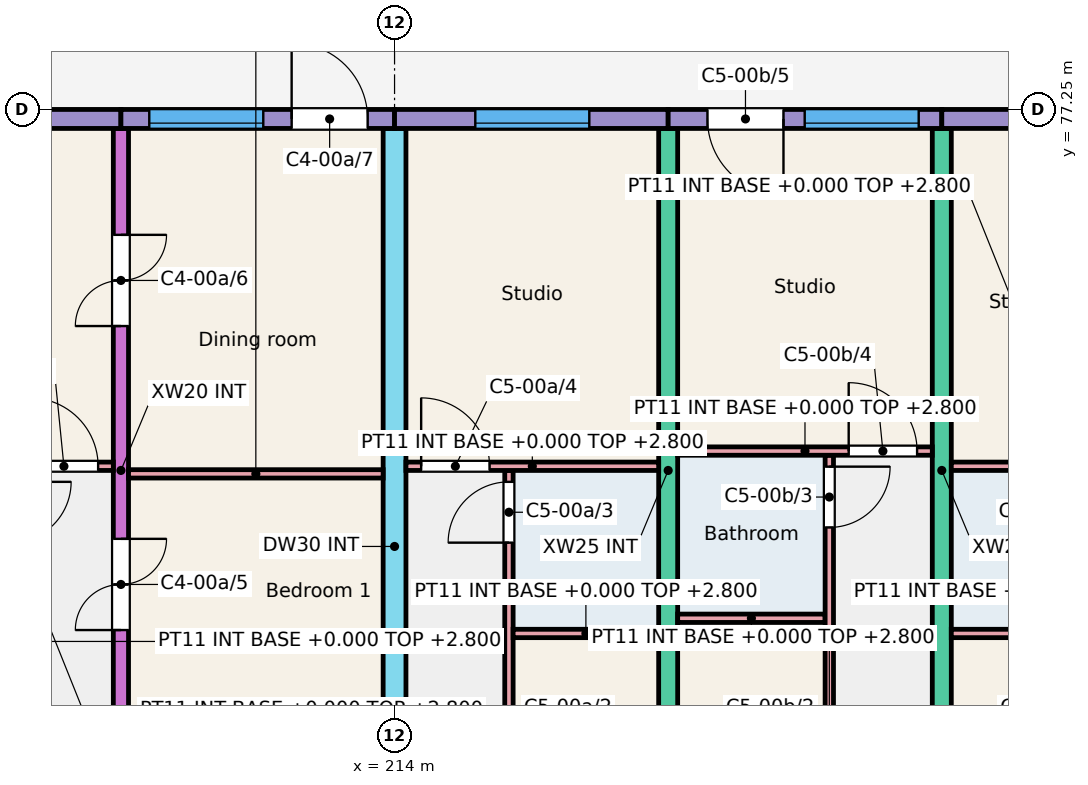
"""IFC4 building model, lengths in metres.
Left out: names, types, materials, properties, quantities, classifications, styles, units other than length and angle.
Written with IfcOpenShell. Run it as: python <this file> out.ifc"""

import sys

from ifc_helpers import new_model, si_unit, direction, frame, frame_2d, origin, place, context, subcontext, project, spatial, rectangle, extrude, element, fill, save


model = new_model("IFC4")
c1 = context("Model", 3, precision=1e-05, world=origin(), true_north=direction((0.0, 1.0)))
c2 = subcontext(c1, "Body", "Model", "MODEL_VIEW")
j1 = project(units=[si_unit("LENGTHUNIT", "METRE"), si_unit("PLANEANGLEUNIT", "RADIAN")], contexts=[c1])
p1 = place(None, origin())
s1 = spatial("IfcSite", under=j1, at=p1, CompositionType="ELEMENT")
p2 = place(p1, origin())
s2 = spatial("IfcBuilding", under=s1, at=p2, CompositionType="ELEMENT")
p3 = place(p2, origin())
s3 = spatial("IfcBuildingStorey", under=s2, at=p3, CompositionType="ELEMENT", Elevation=0.0)
p4 = place(p3, frame((210.4, 68.0, -0.25), z_axis=(0.0, 0.0, 1.0), x_axis=(0.0, 1.0, 0.0)))
e1 = element("IfcWall", 1, at=p4, inside=s3, PredefinedType="SHEAR", context=c2, shape_type="SweptSolid", body=[
    extrude(rectangle(XDim=9.0, YDim=0.2, at=frame_2d((4.5, 0.0))), origin(), (0.0, 0.0, 1.0), 3.25),
])
p5 = place(p4, frame((2.4, 0.0, 0.25)))
e2 = element("IfcOpeningElement", 2, at=p5, cuts=e1, PredefinedType="OPENING", context=c2, shape_type="SweptSolid", body=[
    extrude(rectangle(XDim=1.2, YDim=2.1, at=frame_2d((0.6, 1.05))), frame((0.0, 0.11, 0.0), z_axis=(0.0, -1.0, 0.0), x_axis=(1.0, 0.0, 0.0)), (0.0, 0.0, 1.0), 0.22),
])
p6 = place(p4, frame((6.4, 0.0, 0.25)))
e3 = element("IfcOpeningElement", 3, at=p6, cuts=e1, PredefinedType="OPENING", context=c2, shape_type="SweptSolid", body=[
    extrude(rectangle(XDim=1.2, YDim=2.1, at=frame_2d((0.6, 1.05))), frame((0.0, 0.11, 0.0), z_axis=(0.0, -1.0, 0.0), x_axis=(1.0, 0.0, 0.0)), (0.0, 0.0, 1.0), 0.22),
])
p7 = place(p3, frame((214.0, 66.0, -0.25), z_axis=(0.0, 0.0, 1.0), x_axis=(0.0, 1.0, 0.0)))
e4 = element("IfcWall", 4, at=p7, inside=s3, PredefinedType="SHEAR", context=c2, shape_type="SweptSolid", body=[
    extrude(rectangle(XDim=11.0, YDim=0.3, at=frame_2d((5.5, 0.0))), origin(), (0.0, 0.0, 1.0), 3.25),
])
p8 = place(p7, frame((0.3, 0.0, 0.25)))
e5 = element("IfcOpeningElement", 5, at=p8, cuts=e4, PredefinedType="OPENING", context=c2, shape_type="SweptSolid", body=[
    extrude(rectangle(XDim=1.2, YDim=2.1, at=frame_2d((0.6, 1.05))), frame((0.0, 0.16, 0.0), z_axis=(0.0, -1.0, 0.0), x_axis=(1.0, 0.0, 0.0)), (0.0, 0.0, 1.0), 0.32),
])
for number, where, z_axis, x_axis in (
    (6, (217.6, 68.0, -0.25), (0.0, 0.0, 1.0), (0.0, 1.0, 0.0)),
    (7, (221.2, 68.0, -0.25), (0.0, 0.0, 1.0), (0.0, 1.0, 0.0)),
):
    element("IfcWall", number, at=place(p3, frame(where, z_axis=z_axis, x_axis=x_axis)), inside=s3, PredefinedType="SHEAR", context=c2, shape_type="SweptSolid", body=[
        extrude(rectangle(XDim=9.0, YDim=0.25, at=frame_2d((4.5, 0.0))), origin(), (0.0, 0.0, 1.0), 3.25),
    ])
p9 = place(p3, frame((206.8, 77.125, -0.25), z_axis=(0.0, 0.0, 1.0), x_axis=(1.0, 0.0, 0.0)))
e8 = element("IfcWall", 8, at=p9, inside=s3, PredefinedType="SOLIDWALL", context=c2, shape_type="SweptSolid", body=[
    extrude(rectangle(XDim=3.6, YDim=0.25, at=frame_2d((1.8, 0.0))), origin(), (0.0, 0.0, 1.0), 3.25),
])
p10 = place(p9, frame((1.062, 0.0, 1.15)))
e9 = element("IfcOpeningElement", 9, at=p10, cuts=e8, PredefinedType="OPENING", context=c2, shape_type="SweptSolid", body=[
    extrude(rectangle(XDim=1.5, YDim=1.5, at=frame_2d((0.75, 0.75))), frame((0.0, 0.135, 0.0), z_axis=(0.0, -1.0, 0.0), x_axis=(1.0, 0.0, 0.0)), (0.0, 0.0, 1.0), 0.27),
])
p11 = place(p3, frame((210.4, 77.125, -0.25), z_axis=(0.0, 0.0, 1.0), x_axis=(1.0, 0.0, 0.0)))
e10 = element("IfcWall", 10, at=p11, inside=s3, PredefinedType="SOLIDWALL", context=c2, shape_type="SweptSolid", body=[
    extrude(rectangle(XDim=3.6, YDim=0.25, at=frame_2d((1.8, 0.0))), origin(), (0.0, 0.0, 1.0), 3.25),
])
p12 = place(p11, frame((0.373, 0.0, 1.15)))
e11 = element("IfcOpeningElement", 11, at=p12, cuts=e10, PredefinedType="OPENING", context=c2, shape_type="SweptSolid", body=[
    extrude(rectangle(XDim=1.5, YDim=1.5, at=frame_2d((0.75, 0.75))), frame((0.0, 0.135, 0.0), z_axis=(0.0, -1.0, 0.0), x_axis=(1.0, 0.0, 0.0)), (0.0, 0.0, 1.0), 0.27),
])
p13 = place(p11, frame((2.246, 0.0, 0.25)))
e12 = element("IfcOpeningElement", 12, at=p13, cuts=e10, PredefinedType="OPENING", context=c2, shape_type="SweptSolid", body=[
    extrude(rectangle(XDim=1.0, YDim=2.1, at=frame_2d((0.5, 1.05))), frame((0.0, 0.135, 0.0), z_axis=(0.0, -1.0, 0.0), x_axis=(1.0, 0.0, 0.0)), (0.0, 0.0, 1.0), 0.27),
])
p14 = place(p3, frame((214.0, 77.125, -0.25), z_axis=(0.0, 0.0, 1.0), x_axis=(1.0, 0.0, 0.0)))
e13 = element("IfcWall", 13, at=p14, inside=s3, PredefinedType="SOLIDWALL", context=c2, shape_type="SweptSolid", body=[
    extrude(rectangle(XDim=3.6, YDim=0.25, at=frame_2d((1.8, 0.0))), origin(), (0.0, 0.0, 1.0), 3.25),
])
p15 = place(p14, frame((1.062, 0.0, 1.15)))
e14 = element("IfcOpeningElement", 14, at=p15, cuts=e13, PredefinedType="OPENING", context=c2, shape_type="SweptSolid", body=[
    extrude(rectangle(XDim=1.5, YDim=1.5, at=frame_2d((0.75, 0.75))), frame((0.0, 0.135, 0.0), z_axis=(0.0, -1.0, 0.0), x_axis=(1.0, 0.0, 0.0)), (0.0, 0.0, 1.0), 0.27),
])
p16 = place(p3, frame((217.6, 77.125, -0.25), z_axis=(0.0, 0.0, 1.0), x_axis=(1.0, 0.0, 0.0)))
e15 = element("IfcWall", 15, at=p16, inside=s3, PredefinedType="SOLIDWALL", context=c2, shape_type="SweptSolid", body=[
    extrude(rectangle(XDim=3.6, YDim=0.25, at=frame_2d((1.8, 0.0))), origin(), (0.0, 0.0, 1.0), 3.25),
])
p17 = place(p16, frame((1.796, 0.0, 1.15)))
e16 = element("IfcOpeningElement", 16, at=p17, cuts=e15, PredefinedType="OPENING", context=c2, shape_type="SweptSolid", body=[
    extrude(rectangle(XDim=1.5, YDim=1.5, at=frame_2d((0.75, 0.75))), frame((0.0, 0.135, 0.0), z_axis=(0.0, -1.0, 0.0), x_axis=(1.0, 0.0, 0.0)), (0.0, 0.0, 1.0), 0.27),
])
p18 = place(p16, frame((0.517, 0.0, 0.25)))
e17 = element("IfcOpeningElement", 17, at=p18, cuts=e15, PredefinedType="OPENING", context=c2, shape_type="SweptSolid", body=[
    extrude(rectangle(XDim=1.0, YDim=2.1, at=frame_2d((0.5, 1.05))), frame((0.0, 0.135, 0.0), z_axis=(0.0, -1.0, 0.0), x_axis=(1.0, 0.0, 0.0)), (0.0, 0.0, 1.0), 0.27),
])
p19 = place(p3, frame((221.2, 77.125, -0.25), z_axis=(0.0, 0.0, 1.0), x_axis=(1.0, 0.0, 0.0)))
e18 = element("IfcWall", 18, at=p19, inside=s3, PredefinedType="SOLIDWALL", context=c2, shape_type="SweptSolid", body=[
    extrude(rectangle(XDim=3.6, YDim=0.25, at=frame_2d((1.8, 0.0))), origin(), (0.0, 0.0, 1.0), 3.25),
])
p20 = place(p19, frame((1.05, 0.0, 1.15)))
e19 = element("IfcOpeningElement", 19, at=p20, cuts=e18, PredefinedType="OPENING", context=c2, shape_type="SweptSolid", body=[
    extrude(rectangle(XDim=1.5, YDim=1.5, at=frame_2d((0.75, 0.75))), frame((0.0, 0.135, 0.0), z_axis=(0.0, -1.0, 0.0), x_axis=(1.0, 0.0, 0.0)), (0.0, 0.0, 1.0), 0.27),
])
p21 = place(p3, frame((206.925, 72.555, 0.0), z_axis=(0.0, 0.0, 1.0), x_axis=(1.0, 0.0, 0.0)))
e20 = element("IfcWall", 20, at=p21, inside=s3, PredefinedType="PARTITIONING", context=c2, shape_type="SweptSolid", body=[
    extrude(rectangle(XDim=3.375, YDim=0.11, at=frame_2d((1.688, 0.0))), origin(), (0.0, 0.0, 1.0), 2.8),
])
p22 = place(p21, frame((2.275, 0.0, 0.0)))
e21 = element("IfcOpeningElement", 21, at=p22, cuts=e20, PredefinedType="OPENING", context=c2, shape_type="SweptSolid", body=[
    extrude(rectangle(XDim=0.9, YDim=2.1, at=frame_2d((0.45, 1.05))), frame((0.0, 0.065, 0.0), z_axis=(0.0, -1.0, 0.0), x_axis=(1.0, 0.0, 0.0)), (0.0, 0.0, 1.0), 0.13),
])
p23 = place(p3, frame((210.5, 72.455, 0.0), z_axis=(0.0, 0.0, 1.0), x_axis=(1.0, 0.0, 0.0)))
e22 = element("IfcWall", 22, at=p23, inside=s3, PredefinedType="PARTITIONING", context=c2, shape_type="SweptSolid", body=[
    extrude(rectangle(XDim=3.35, YDim=0.11, at=frame_2d((1.675, 0.0))), origin(), (0.0, 0.0, 1.0), 2.8),
])
p24 = place(p3, frame((215.505, 68.0, 0.0), z_axis=(0.0, 0.0, 1.0), x_axis=(0.0, 1.0, 0.0)))
e23 = element("IfcWall", 23, at=p24, inside=s3, PredefinedType="PARTITIONING", context=c2, shape_type="SweptSolid", body=[
    extrude(rectangle(XDim=4.5, YDim=0.11, at=frame_2d((2.25, 0.0))), origin(), (0.0, 0.0, 1.0), 2.8),
])
p25 = place(p24, frame((0.2, 0.0, 0.0)))
e24 = element("IfcOpeningElement", 24, at=p25, cuts=e23, PredefinedType="OPENING", context=c2, shape_type="SweptSolid", body=[
    extrude(rectangle(XDim=0.8, YDim=2.1, at=frame_2d((0.4, 1.05))), frame((0.0, 0.065, 0.0), z_axis=(0.0, -1.0, 0.0), x_axis=(1.0, 0.0, 0.0)), (0.0, 0.0, 1.0), 0.13),
])
p26 = place(p24, frame((3.55, 0.0, 0.0)))
e25 = element("IfcOpeningElement", 25, at=p26, cuts=e23, PredefinedType="OPENING", context=c2, shape_type="SweptSolid", body=[
    extrude(rectangle(XDim=0.8, YDim=2.1, at=frame_2d((0.4, 1.05))), frame((0.0, 0.065, 0.0), z_axis=(0.0, -1.0, 0.0), x_axis=(1.0, 0.0, 0.0)), (0.0, 0.0, 1.0), 0.13),
])
p27 = place(p3, frame((215.56, 70.355, 0.0), z_axis=(0.0, 0.0, 1.0), x_axis=(1.0, 0.0, 0.0)))
e26 = element("IfcWall", 26, at=p27, inside=s3, PredefinedType="PARTITIONING", context=c2, shape_type="SweptSolid", body=[
    extrude(rectangle(XDim=1.915, YDim=0.11, at=frame_2d((0.958, 0.0))), origin(), (0.0, 0.0, 1.0), 2.8),
])
p28 = place(p3, frame((214.15, 72.555, 0.0), z_axis=(0.0, 0.0, 1.0), x_axis=(1.0, 0.0, 0.0)))
e27 = element("IfcWall", 27, at=p28, inside=s3, PredefinedType="PARTITIONING", context=c2, shape_type="SweptSolid", body=[
    extrude(rectangle(XDim=3.325, YDim=0.11, at=frame_2d((1.663, 0.0))), origin(), (0.0, 0.0, 1.0), 2.8),
])
p29 = place(p28, frame((0.2, 0.0, 0.0)))
e28 = element("IfcOpeningElement", 28, at=p29, cuts=e27, PredefinedType="OPENING", context=c2, shape_type="SweptSolid", body=[
    extrude(rectangle(XDim=0.9, YDim=2.1, at=frame_2d((0.45, 1.05))), frame((0.0, 0.065, 0.0), z_axis=(0.0, -1.0, 0.0), x_axis=(1.0, 0.0, 0.0)), (0.0, 0.0, 1.0), 0.13),
])
p30 = place(p3, frame((217.725, 70.555, 0.0), z_axis=(0.0, 0.0, 1.0), x_axis=(1.0, 0.0, 0.0)))
e29 = element("IfcWall", 29, at=p30, inside=s3, PredefinedType="PARTITIONING", context=c2, shape_type="SweptSolid", body=[
    extrude(rectangle(XDim=1.94, YDim=0.11, at=frame_2d((0.97, 0.0))), origin(), (0.0, 0.0, 1.0), 2.8),
])
p31 = place(p3, frame((219.72, 68.0, 0.0), z_axis=(0.0, 0.0, 1.0), x_axis=(0.0, 1.0, 0.0)))
e30 = element("IfcWall", 30, at=p31, inside=s3, PredefinedType="PARTITIONING", context=c2, shape_type="SweptSolid", body=[
    extrude(rectangle(XDim=4.7, YDim=0.11, at=frame_2d((2.35, 0.0))), origin(), (0.0, 0.0, 1.0), 2.8),
])
p32 = place(p31, frame((0.2, 0.0, 0.0)))
e31 = element("IfcOpeningElement", 31, at=p32, cuts=e30, PredefinedType="OPENING", context=c2, shape_type="SweptSolid", body=[
    extrude(rectangle(XDim=0.8, YDim=2.1, at=frame_2d((0.4, 1.05))), frame((0.0, 0.065, 0.0), z_axis=(0.0, -1.0, 0.0), x_axis=(1.0, 0.0, 0.0)), (0.0, 0.0, 1.0), 0.13),
])
p33 = place(p31, frame((3.75, 0.0, 0.0)))
e32 = element("IfcOpeningElement", 32, at=p33, cuts=e30, PredefinedType="OPENING", context=c2, shape_type="SweptSolid", body=[
    extrude(rectangle(XDim=0.8, YDim=2.1, at=frame_2d((0.4, 1.05))), frame((0.0, 0.065, 0.0), z_axis=(0.0, -1.0, 0.0), x_axis=(1.0, 0.0, 0.0)), (0.0, 0.0, 1.0), 0.13),
])
p34 = place(p3, frame((217.725, 72.755, 0.0), z_axis=(0.0, 0.0, 1.0), x_axis=(1.0, 0.0, 0.0)))
e33 = element("IfcWall", 33, at=p34, inside=s3, PredefinedType="PARTITIONING", context=c2, shape_type="SweptSolid", body=[
    extrude(rectangle(XDim=3.35, YDim=0.11, at=frame_2d((1.675, 0.0))), origin(), (0.0, 0.0, 1.0), 2.8),
])
p35 = place(p34, frame((2.25, 0.0, 0.0)))
e34 = element("IfcOpeningElement", 34, at=p35, cuts=e33, PredefinedType="OPENING", context=c2, shape_type="SweptSolid", body=[
    extrude(rectangle(XDim=0.9, YDim=2.1, at=frame_2d((0.45, 1.05))), frame((0.0, 0.065, 0.0), z_axis=(0.0, -1.0, 0.0), x_axis=(1.0, 0.0, 0.0)), (0.0, 0.0, 1.0), 0.13),
])
p36 = place(p3, frame((221.325, 70.355, 0.0), z_axis=(0.0, 0.0, 1.0), x_axis=(1.0, 0.0, 0.0)))
e35 = element("IfcWall", 35, at=p36, inside=s3, PredefinedType="PARTITIONING", context=c2, shape_type="SweptSolid", body=[
    extrude(rectangle(XDim=1.94, YDim=0.11, at=frame_2d((0.97, 0.0))), origin(), (0.0, 0.0, 1.0), 2.8),
])
p37 = place(p3, frame((221.325, 72.555, 0.0), z_axis=(0.0, 0.0, 1.0), x_axis=(1.0, 0.0, 0.0)))
e36 = element("IfcWall", 36, at=p37, inside=s3, PredefinedType="PARTITIONING", context=c2, shape_type="SweptSolid", body=[
    extrude(rectangle(XDim=3.35, YDim=0.11, at=frame_2d((1.675, 0.0))), origin(), (0.0, 0.0, 1.0), 2.8),
])
p38 = place(p37, frame((2.25, 0.0, 0.0)))
e37 = element("IfcOpeningElement", 37, at=p38, cuts=e36, PredefinedType="OPENING", context=c2, shape_type="SweptSolid", body=[
    extrude(rectangle(XDim=0.9, YDim=2.1, at=frame_2d((0.45, 1.05))), frame((0.0, 0.065, 0.0), z_axis=(0.0, -1.0, 0.0), x_axis=(1.0, 0.0, 0.0)), (0.0, 0.0, 1.0), 0.13),
])
p39 = place(p12, origin())
e38 = element("IfcWindow", 38, at=p39, inside=s3, PartitioningType="SINGLE_PANEL", PredefinedType="WINDOW", context=c2, shape_type="SweptSolid", body=[
    extrude(rectangle(XDim=1.5, YDim=1.5, at=frame_2d((0.75, 0.75))), frame((0.0, -0.025, 0.0), z_axis=(0.0, -1.0, 0.0), x_axis=(1.0, 0.0, 0.0)), (0.0, 0.0, 1.0), 0.06),
])
fill(e11, e38)
p40 = place(p15, origin())
e39 = element("IfcWindow", 39, at=p40, inside=s3, PartitioningType="SINGLE_PANEL", PredefinedType="WINDOW", context=c2, shape_type="SweptSolid", body=[
    extrude(rectangle(XDim=1.5, YDim=1.5, at=frame_2d((0.75, 0.75))), frame((0.0, -0.025, 0.0), z_axis=(0.0, -1.0, 0.0), x_axis=(1.0, 0.0, 0.0)), (0.0, 0.0, 1.0), 0.06),
])
fill(e14, e39)
p41 = place(p17, origin())
e40 = element("IfcWindow", 40, at=p41, inside=s3, PartitioningType="SINGLE_PANEL", PredefinedType="WINDOW", context=c2, shape_type="SweptSolid", body=[
    extrude(rectangle(XDim=1.5, YDim=1.5, at=frame_2d((0.75, 0.75))), frame((0.0, -0.025, 0.0), z_axis=(0.0, -1.0, 0.0), x_axis=(1.0, 0.0, 0.0)), (0.0, 0.0, 1.0), 0.06),
])
fill(e16, e40)
p42 = place(p22, origin())
e41 = element("IfcDoor", 41, at=p42, inside=s3, OperationType="SINGLE_SWING_LEFT", PredefinedType="DOOR", context=c2, shape_type="SweptSolid", body=[
    extrude(rectangle(XDim=0.9, YDim=2.1, at=frame_2d((0.45, 1.05))), frame((0.0, 0.025, 0.0), z_axis=(0.0, -1.0, 0.0), x_axis=(1.0, 0.0, 0.0)), (0.0, 0.0, 1.0), 0.05),
])
fill(e21, e41)
p43 = place(p5, origin())
e42 = element("IfcDoor", 42, at=p43, inside=s3, OperationType="DOUBLE_DOOR_SINGLE_SWING", PredefinedType="DOOR", context=c2, shape_type="SweptSolid", body=[
    extrude(rectangle(XDim=1.2, YDim=2.1, at=frame_2d((0.6, 1.05))), frame((0.0, 0.025, 0.0), z_axis=(0.0, -1.0, 0.0), x_axis=(1.0, 0.0, 0.0)), (0.0, 0.0, 1.0), 0.05),
])
fill(e2, e42)
p44 = place(p6, origin())
e43 = element("IfcDoor", 43, at=p44, inside=s3, OperationType="DOUBLE_DOOR_SINGLE_SWING", PredefinedType="DOOR", context=c2, shape_type="SweptSolid", body=[
    extrude(rectangle(XDim=1.2, YDim=2.1, at=frame_2d((0.6, 1.05))), frame((0.0, 0.025, 0.0), z_axis=(0.0, -1.0, 0.0), x_axis=(1.0, 0.0, 0.0)), (0.0, 0.0, 1.0), 0.05),
])
fill(e3, e43)
p45 = place(p13, origin())
e44 = element("IfcDoor", 44, at=p45, inside=s3, OperationType="SINGLE_SWING_LEFT", PredefinedType="DOOR", context=c2, shape_type="SweptSolid", body=[
    extrude(rectangle(XDim=1.0, YDim=2.1, at=frame_2d((0.5, 1.05))), frame((0.0, 0.025, 0.0), z_axis=(0.0, -1.0, 0.0), x_axis=(1.0, 0.0, 0.0)), (0.0, 0.0, 1.0), 0.05),
])
fill(e12, e44)
p46 = place(p26, origin())
e45 = element("IfcDoor", 45, at=p46, inside=s3, OperationType="SINGLE_SWING_LEFT", PredefinedType="DOOR", context=c2, shape_type="SweptSolid", body=[
    extrude(rectangle(XDim=0.8, YDim=2.1, at=frame_2d((0.4, 1.05))), frame((0.0, 0.025, 0.0), z_axis=(0.0, -1.0, 0.0), x_axis=(1.0, 0.0, 0.0)), (0.0, 0.0, 1.0), 0.05),
])
fill(e25, e45)
p47 = place(p29, origin())
e46 = element("IfcDoor", 46, at=p47, inside=s3, OperationType="SINGLE_SWING_LEFT", PredefinedType="DOOR", context=c2, shape_type="SweptSolid", body=[
    extrude(rectangle(XDim=0.9, YDim=2.1, at=frame_2d((0.45, 1.05))), frame((0.0, 0.025, 0.0), z_axis=(0.0, -1.0, 0.0), x_axis=(1.0, 0.0, 0.0)), (0.0, 0.0, 1.0), 0.05),
])
fill(e28, e46)
p48 = place(p33, origin())
e47 = element("IfcDoor", 47, at=p48, inside=s3, OperationType="SINGLE_SWING_RIGHT", PredefinedType="DOOR", context=c2, shape_type="SweptSolid", body=[
    extrude(rectangle(XDim=0.8, YDim=2.1, at=frame_2d((0.4, 1.05))), frame((0.0, 0.025, 0.0), z_axis=(0.0, -1.0, 0.0), x_axis=(1.0, 0.0, 0.0)), (0.0, 0.0, 1.0), 0.05),
])
fill(e32, e47)
p49 = place(p35, origin())
e48 = element("IfcDoor", 48, at=p49, inside=s3, OperationType="SINGLE_SWING_LEFT", PredefinedType="DOOR", context=c2, shape_type="SweptSolid", body=[
    extrude(rectangle(XDim=0.9, YDim=2.1, at=frame_2d((0.45, 1.05))), frame((0.0, 0.025, 0.0), z_axis=(0.0, -1.0, 0.0), x_axis=(1.0, 0.0, 0.0)), (0.0, 0.0, 1.0), 0.05),
])
fill(e34, e48)
p50 = place(p18, origin())
e49 = element("IfcDoor", 49, at=p50, inside=s3, OperationType="SINGLE_SWING_RIGHT", PredefinedType="DOOR", context=c2, shape_type="SweptSolid", body=[
    extrude(rectangle(XDim=1.0, YDim=2.1, at=frame_2d((0.5, 1.05))), frame((0.0, 0.025, 0.0), z_axis=(0.0, -1.0, 0.0), x_axis=(1.0, 0.0, 0.0)), (0.0, 0.0, 1.0), 0.05),
])
fill(e17, e49)
save(model, sys.argv[1])
